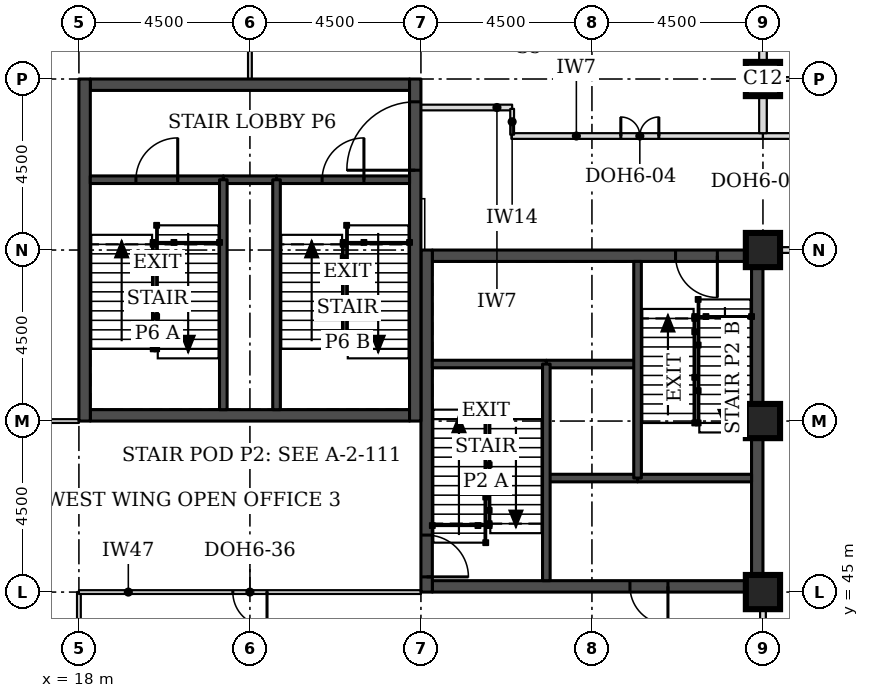
"""IFC4 building model, lengths in metres.
Left out: names, types, materials, properties, quantities, classifications, styles, units other than length and angle.
Written with IfcOpenShell. Run it as: python <this file> out.ifc"""

import sys

from ifc_helpers import new_model, si_unit, direction, frame, frame_2d, origin, origin_2d, place, context, subcontext, project, spatial, rectangle, extrude, element, fill, save


model = new_model("IFC4")
c1 = context("Model", 3, precision=1e-05, world=origin(), true_north=direction((0.0, 1.0)))
c2 = subcontext(c1, "Body", "Model", "MODEL_VIEW")
j1 = project(units=[si_unit("LENGTHUNIT", "METRE"), si_unit("PLANEANGLEUNIT", "RADIAN")], contexts=[c1])
p1 = place(None, origin())
s1 = spatial("IfcSite", under=j1, at=p1, CompositionType="ELEMENT")
p2 = place(p1, origin())
s2 = spatial("IfcBuilding", under=s1, at=p2, CompositionType="ELEMENT")
p3 = place(p2, frame((0.0, 0.0, 184.7)))
s3 = spatial("IfcBuildingStorey", under=s2, at=p3, CompositionType="ELEMENT", Elevation=184.7)
for number, where, z_axis, x_axis in (
    (1, (36.0, 45.0, 0.0), (0.0, 0.0, 1.0), (1.0, 0.0, 0.0)),
    (2, (36.0, 49.5, 0.0), (0.0, 0.0, 1.0), (1.0, 0.0, 0.0)),
    (3, (36.0, 54.0, 0.0), (0.0, 0.0, 1.0), (1.0, 0.0, 0.0)),
    (4, (36.0, 58.5, 0.0), (0.0, 0.0, 1.0), (1.0, 0.0, 0.0)),
):
    element("IfcColumn", number, at=place(p3, frame(where, z_axis=z_axis, x_axis=x_axis)), inside=s3, PredefinedType="COLUMN", context=c2, shape_type="SweptSolid", body=[
        extrude(rectangle(XDim=0.9, YDim=0.9, at=origin_2d()), origin(), (0.0, 0.0, 1.0), 3.7),
    ])
p4 = place(p3, frame((27.3, 45.15, 0.0), z_axis=(0.0, 0.0, 1.0), x_axis=(1.0, 0.0, 0.0)))
e5 = element("IfcWall", 5, at=p4, inside=s3, PredefinedType="SHEAR", context=c2, shape_type="SweptSolid", body=[
    extrude(rectangle(XDim=8.4, YDim=0.3, at=frame_2d((4.2, 0.0))), origin(), (0.0, 0.0, 1.0), 3.7),
])
p5 = place(p4, frame((5.2, 0.0, 0.0)))
e6 = element("IfcOpeningElement", 6, at=p5, cuts=e5, PredefinedType="OPENING", context=c2, shape_type="SweptSolid", body=[
    extrude(rectangle(XDim=1.0, YDim=2.1, at=frame_2d((0.5, 1.05))), frame((0.0, 0.16, 0.0), z_axis=(0.0, -1.0, 0.0), x_axis=(1.0, 0.0, 0.0)), (0.0, 0.0, 1.0), 0.32),
])
p6 = place(p3, frame((27.3, 53.85, 0.0), z_axis=(0.0, 0.0, 1.0), x_axis=(1.0, 0.0, 0.0)))
e7 = element("IfcWall", 7, at=p6, inside=s3, PredefinedType="SHEAR", context=c2, shape_type="SweptSolid", body=[
    extrude(rectangle(XDim=8.4, YDim=0.3, at=frame_2d((4.2, 0.0))), origin(), (0.0, 0.0, 1.0), 3.7),
])
p7 = place(p6, frame((6.4, 0.0, 0.0)))
e8 = element("IfcOpeningElement", 8, at=p7, cuts=e7, PredefinedType="OPENING", context=c2, shape_type="SweptSolid", body=[
    extrude(rectangle(XDim=1.1, YDim=2.1, at=frame_2d((0.55, 1.05))), frame((0.0, 0.16, 0.0), z_axis=(0.0, -1.0, 0.0), x_axis=(1.0, 0.0, 0.0)), (0.0, 0.0, 1.0), 0.32),
])
p8 = place(p3, frame((27.15, 45.0, 0.0), z_axis=(0.0, 0.0, 1.0), x_axis=(0.0, 1.0, 0.0)))
e9 = element("IfcWall", 9, at=p8, inside=s3, PredefinedType="SHEAR", context=c2, shape_type="SweptSolid", body=[
    extrude(rectangle(XDim=9.0, YDim=0.3, at=frame_2d((4.5, 0.0))), origin(), (0.0, 0.0, 1.0), 3.7),
])
p9 = place(p8, frame((0.4, 0.0, 0.0)))
e10 = element("IfcOpeningElement", 10, at=p9, cuts=e9, PredefinedType="OPENING", context=c2, shape_type="SweptSolid", body=[
    extrude(rectangle(XDim=1.1, YDim=2.1, at=frame_2d((0.55, 1.05))), frame((0.0, 0.16, 0.0), z_axis=(0.0, -1.0, 0.0), x_axis=(1.0, 0.0, 0.0)), (0.0, 0.0, 1.0), 0.32),
])
p10 = place(p3, frame((35.85, 45.0, 0.0), z_axis=(0.0, 0.0, 1.0), x_axis=(0.0, 1.0, 0.0)))
e11 = element("IfcWall", 11, at=p10, inside=s3, PredefinedType="SHEAR", context=c2, shape_type="SweptSolid", body=[
    extrude(rectangle(XDim=9.0, YDim=0.3, at=frame_2d((4.5, 0.0))), origin(), (0.0, 0.0, 1.0), 3.7),
])
for number, where, z_axis, x_axis in (
    (12, (18.3, 49.65, 0.0), (0.0, 0.0, 1.0), (1.0, 0.0, 0.0)),
    (13, (18.3, 58.35, 0.0), (0.0, 0.0, 1.0), (1.0, 0.0, 0.0)),
):
    element("IfcWall", number, at=place(p3, frame(where, z_axis=z_axis, x_axis=x_axis)), inside=s3, PredefinedType="SHEAR", context=c2, shape_type="SweptSolid", body=[
        extrude(rectangle(XDim=8.4, YDim=0.3, at=frame_2d((4.2, 0.0))), origin(), (0.0, 0.0, 1.0), 3.7),
    ])
p11 = place(p3, frame((18.15, 49.5, 0.0), z_axis=(0.0, 0.0, 1.0), x_axis=(0.0, 1.0, 0.0)))
e14 = element("IfcWall", 14, at=p11, inside=s3, PredefinedType="SHEAR", context=c2, shape_type="SweptSolid", body=[
    extrude(rectangle(XDim=9.0, YDim=0.3, at=frame_2d((4.5, 0.0))), origin(), (0.0, 0.0, 1.0), 3.7),
])
p12 = place(p3, frame((26.85, 49.5, 0.0), z_axis=(0.0, 0.0, 1.0), x_axis=(0.0, 1.0, 0.0)))
e15 = element("IfcWall", 15, at=p12, inside=s3, PredefinedType="SHEAR", context=c2, shape_type="SweptSolid", body=[
    extrude(rectangle(XDim=9.0, YDim=0.3, at=frame_2d((4.5, 0.0))), origin(), (0.0, 0.0, 1.0), 3.7),
])
p13 = place(p12, frame((6.6, 0.0, 0.0)))
e16 = element("IfcOpeningElement", 16, at=p13, cuts=e15, PredefinedType="OPENING", context=c2, shape_type="SweptSolid", body=[
    extrude(rectangle(XDim=1.8, YDim=2.1, at=frame_2d((0.9, 1.05))), frame((0.0, 0.16, 0.0), z_axis=(0.0, -1.0, 0.0), x_axis=(1.0, 0.0, 0.0)), (0.0, 0.0, 1.0), 0.32),
])
p14 = place(p3, frame((17.792, 63.676, 0.0), z_axis=(0.0, 0.0, 1.0), x_axis=(-0.707106781187, -0.707106781187, 0.0)))
e17 = element("IfcWall", 17, at=p14, inside=s3, PredefinedType="STANDARD", context=c2, shape_type="SweptSolid", body=[
    extrude(rectangle(XDim=7.027, YDim=0.35, at=frame_2d((3.513, 0.0))), origin(), (0.0, 0.0, 1.0), 3.525),
])
p15 = place(p14, frame((1.863, 0.0, 0.9)))
e18 = element("IfcOpeningElement", 18, at=p15, cuts=e17, PredefinedType="OPENING", context=c2, shape_type="SweptSolid", body=[
    extrude(rectangle(XDim=3.3, YDim=1.9, at=frame_2d((1.65, 0.95))), frame((0.0, 0.185, 0.0), z_axis=(0.0, -1.0, 0.0), x_axis=(1.0, 0.0, 0.0)), (0.0, 0.0, 1.0), 0.37),
])
p16 = place(p3, frame((12.824, 44.792, 0.0), z_axis=(0.0, 0.0, 1.0), x_axis=(0.707106781187, -0.707106781187, 0.0)))
e19 = element("IfcWall", 19, at=p16, inside=s3, PredefinedType="STANDARD", context=c2, shape_type="SweptSolid", body=[
    extrude(rectangle(XDim=7.027, YDim=0.35, at=frame_2d((3.513, 0.0))), origin(), (0.0, 0.0, 1.0), 3.525),
])
p17 = place(p16, frame((1.863, 0.0, 0.9)))
e20 = element("IfcOpeningElement", 20, at=p17, cuts=e19, PredefinedType="OPENING", context=c2, shape_type="SweptSolid", body=[
    extrude(rectangle(XDim=3.3, YDim=1.9, at=frame_2d((1.65, 0.95))), frame((0.0, 0.185, 0.0), z_axis=(0.0, -1.0, 0.0), x_axis=(1.0, 0.0, 0.0)), (0.0, 0.0, 1.0), 0.37),
])
p18 = place(p3, frame((36.45, 54.0, 0.0), z_axis=(0.0, 0.0, 1.0), x_axis=(1.0, 0.0, 0.0)))
e21 = element("IfcWall", 21, at=p18, inside=s3, PredefinedType="PARTITIONING", context=c2, shape_type="SweptSolid", body=[
    extrude(rectangle(XDim=5.625, YDim=0.15, at=frame_2d((2.812, 0.0))), origin(), (0.0, 0.0, 1.0), 3.55),
])
p19 = place(p3, frame((29.38, 57.0, 0.0), z_axis=(0.0, 0.0, 1.0), x_axis=(1.0, 0.0, 0.0)))
e22 = element("IfcWall", 22, at=p19, inside=s3, PredefinedType="PARTITIONING", context=c2, shape_type="SweptSolid", body=[
    extrude(rectangle(XDim=6.62, YDim=0.15, at=frame_2d((3.31, 0.0))), origin(), (0.0, 0.0, 1.0), 3.55),
])
p20 = place(p19, frame((2.88, 0.0, 0.0)))
e23 = element("IfcOpeningElement", 23, at=p20, cuts=e22, PredefinedType="OPENING", context=c2, shape_type="SweptSolid", body=[
    extrude(rectangle(XDim=1.0, YDim=2.1, at=frame_2d((0.5, 1.05))), frame((0.0, 0.085, 0.0), z_axis=(0.0, -1.0, 0.0), x_axis=(1.0, 0.0, 0.0)), (0.0, 0.0, 1.0), 0.17),
])
p21 = place(p3, frame((36.0, 57.0, 0.0), z_axis=(0.0, 0.0, 1.0), x_axis=(1.0, 0.0, 0.0)))
e24 = element("IfcWall", 24, at=p21, inside=s3, PredefinedType="PARTITIONING", context=c2, shape_type="SweptSolid", body=[
    extrude(rectangle(XDim=6.075, YDim=0.15, at=frame_2d((3.038, 0.0))), origin(), (0.0, 0.0, 1.0), 3.55),
])
p22 = place(p21, frame((2.55, 0.0, 0.0)))
e25 = element("IfcOpeningElement", 25, at=p22, cuts=e24, PredefinedType="OPENING", context=c2, shape_type="SweptSolid", body=[
    extrude(rectangle(XDim=1.0, YDim=2.1, at=frame_2d((0.5, 1.05))), frame((0.0, 0.085, 0.0), z_axis=(0.0, -1.0, 0.0), x_axis=(1.0, 0.0, 0.0)), (0.0, 0.0, 1.0), 0.17),
])
p23 = place(p3, frame((36.45, 58.5, 0.0), z_axis=(0.0, 0.0, 1.0), x_axis=(1.0, 0.0, 0.0)))
e26 = element("IfcWall", 26, at=p23, inside=s3, PredefinedType="PARTITIONING", context=c2, shape_type="SweptSolid", body=[
    extrude(rectangle(XDim=2.6, YDim=0.1, at=frame_2d((1.3, 0.0))), origin(), (0.0, 0.0, 1.0), 3.55),
])
p24 = place(p23, frame((0.85, 0.0, 0.0)))
e27 = element("IfcOpeningElement", 27, at=p24, cuts=e26, PredefinedType="OPENING", context=c2, shape_type="SweptSolid", body=[
    extrude(rectangle(XDim=0.9, YDim=2.1, at=frame_2d((0.45, 1.05))), frame((0.0, 0.06, 0.0), z_axis=(0.0, -1.0, 0.0), x_axis=(1.0, 0.0, 0.0)), (0.0, 0.0, 1.0), 0.12),
])
p25 = place(p3, frame((36.0, 40.95, 0.0), z_axis=(0.0, 0.0, 1.0), x_axis=(0.0, 1.0, 0.0)))
e28 = element("IfcWall", 28, at=p25, inside=s3, PredefinedType="PARTITIONING", context=c2, shape_type="SweptSolid", body=[
    extrude(rectangle(XDim=3.63, YDim=0.15, at=frame_2d((1.815, 0.0))), origin(), (0.0, 0.0, 1.0), 2.8),
])
p26 = place(p25, frame((1.4, 0.0, 0.0)))
e29 = element("IfcOpeningElement", 29, at=p26, cuts=e28, PredefinedType="OPENING", context=c2, shape_type="SweptSolid", body=[
    extrude(rectangle(XDim=0.9, YDim=2.1, at=frame_2d((0.45, 1.05))), frame((0.0, 0.085, 0.0), z_axis=(0.0, -1.0, 0.0), x_axis=(1.0, 0.0, 0.0)), (0.0, 0.0, 1.0), 0.17),
])
p27 = place(p3, frame((36.0, 57.075, 0.0), z_axis=(0.0, 0.0, 1.0), x_axis=(0.0, 1.0, 0.0)))
e30 = element("IfcWall", 30, at=p27, inside=s3, PredefinedType="PARTITIONING", context=c2, shape_type="SweptSolid", body=[
    extrude(rectangle(XDim=0.975, YDim=0.2, at=frame_2d((0.488, 0.0))), origin(), (0.0, 0.0, 1.0), 2.8),
])
p28 = place(p3, frame((36.0, 58.92, 0.0), z_axis=(0.0, 0.0, 1.0), x_axis=(0.0, 1.0, 0.0)))
e31 = element("IfcWall", 31, at=p28, inside=s3, PredefinedType="PARTITIONING", context=c2, shape_type="SweptSolid", body=[
    extrude(rectangle(XDim=1.08, YDim=0.2, at=frame_2d((0.54, 0.0))), origin(), (0.0, 0.0, 1.0), 2.8),
])
p29 = place(p3, frame((22.5, 63.0, 0.0), z_axis=(0.0, 0.0, 1.0), x_axis=(0.0, -1.0, 0.0)))
e32 = element("IfcWall", 32, at=p29, inside=s3, PredefinedType="PARTITIONING", context=c2, shape_type="SweptSolid", body=[
    extrude(rectangle(XDim=4.5, YDim=0.1, at=frame_2d((2.25, 0.0))), origin(), (0.0, 0.0, 1.0), 3.55),
])
p30 = place(p29, frame((1.8, 0.0, 0.0)))
e33 = element("IfcOpeningElement", 33, at=p30, cuts=e32, PredefinedType="OPENING", context=c2, shape_type="SweptSolid", body=[
    extrude(rectangle(XDim=0.9, YDim=2.1, at=frame_2d((0.45, 1.05))), frame((0.0, 0.06, 0.0), z_axis=(0.0, -1.0, 0.0), x_axis=(1.0, 0.0, 0.0)), (0.0, 0.0, 1.0), 0.12),
])
p31 = place(p3, frame((13.5, 49.5, 0.0), z_axis=(0.0, 0.0, 1.0), x_axis=(1.0, 0.0, 0.0)))
e34 = element("IfcWall", 34, at=p31, inside=s3, PredefinedType="PARTITIONING", context=c2, shape_type="SweptSolid", body=[
    extrude(rectangle(XDim=4.5, YDim=0.1, at=frame_2d((2.25, 0.0))), origin(), (0.0, 0.0, 1.0), 3.55),
])
p32 = place(p31, frame((1.8, 0.0, 0.0)))
e35 = element("IfcOpeningElement", 35, at=p32, cuts=e34, PredefinedType="OPENING", context=c2, shape_type="SweptSolid", body=[
    extrude(rectangle(XDim=0.9, YDim=2.1, at=frame_2d((0.45, 1.05))), frame((0.0, 0.06, 0.0), z_axis=(0.0, -1.0, 0.0), x_axis=(1.0, 0.0, 0.0)), (0.0, 0.0, 1.0), 0.12),
])
p33 = place(p3, frame((18.0, 40.5, 0.0), z_axis=(0.0, 0.0, 1.0), x_axis=(0.0, 1.0, 0.0)))
e36 = element("IfcWall", 36, at=p33, inside=s3, PredefinedType="PARTITIONING", context=c2, shape_type="SweptSolid", body=[
    extrude(rectangle(XDim=4.5, YDim=0.1, at=frame_2d((2.25, 0.0))), origin(), (0.0, 0.0, 1.0), 3.55),
])
p34 = place(p3, frame((18.0, 45.0, 0.0), z_axis=(0.0, 0.0, 1.0), x_axis=(1.0, 0.0, 0.0)))
e37 = element("IfcWall", 37, at=p34, inside=s3, PredefinedType="PARTITIONING", context=c2, shape_type="SweptSolid", body=[
    extrude(rectangle(XDim=9.0, YDim=0.1, at=frame_2d((4.5, 0.0))), origin(), (0.0, 0.0, 1.0), 2.55),
])
p35 = place(p34, frame((4.05, 0.0, 0.0)))
e38 = element("IfcOpeningElement", 38, at=p35, cuts=e37, PredefinedType="OPENING", context=c2, shape_type="SweptSolid", body=[
    extrude(rectangle(XDim=0.9, YDim=2.1, at=frame_2d((0.45, 1.05))), frame((0.0, 0.06, 0.0), z_axis=(0.0, -1.0, 0.0), x_axis=(1.0, 0.0, 0.0)), (0.0, 0.0, 1.0), 0.12),
])
p36 = place(p3, frame((27.0, 57.75, 0.0), z_axis=(0.0, 0.0, 1.0), x_axis=(1.0, 0.0, 0.0)))
e39 = element("IfcWall", 39, at=p36, inside=s3, PredefinedType="PARTITIONING", context=c2, shape_type="SweptSolid", body=[
    extrude(rectangle(XDim=2.4, YDim=0.15, at=frame_2d((1.2, 0.0))), origin(), (0.0, 0.0, 1.0), 3.55),
])
p37 = place(p3, frame((29.4, 57.715, 0.0), z_axis=(0.0, 0.0, 1.0), x_axis=(0.0, -1.0, 0.0)))
e40 = element("IfcWall", 40, at=p37, inside=s3, PredefinedType="PARTITIONING", context=c2, shape_type="SweptSolid", body=[
    extrude(rectangle(XDim=0.68, YDim=0.1, at=frame_2d((0.34, 0.0))), origin(), (0.0, 0.0, 1.0), 3.55),
])
p38 = place(p3, frame((30.3, 48.0, 0.0), z_axis=(0.0, 0.0, 1.0), x_axis=(1.0, 0.0, 0.0)))
e41 = element("IfcWall", 41, at=p38, inside=s3, PredefinedType="SOLIDWALL", context=c2, shape_type="SweptSolid", body=[
    extrude(rectangle(XDim=2.4, YDim=0.2, at=frame_2d((1.2, 0.0))), origin(), (0.0, 0.0, 1.0), 3.55),
])
p39 = place(p3, frame((32.7, 48.0, 0.0), z_axis=(0.0, 0.0, 1.0), x_axis=(1.0, 0.0, 0.0)))
e42 = element("IfcWall", 42, at=p39, inside=s3, PredefinedType="SOLIDWALL", context=c2, shape_type="SweptSolid", body=[
    extrude(rectangle(XDim=3.0, YDim=0.2, at=frame_2d((1.5, 0.0))), origin(), (0.0, 0.0, 1.0), 3.55),
])
p40 = place(p3, frame((30.3, 51.0, 0.0), z_axis=(0.0, 0.0, 1.0), x_axis=(1.0, 0.0, 0.0)))
e43 = element("IfcWall", 43, at=p40, inside=s3, PredefinedType="SOLIDWALL", context=c2, shape_type="SweptSolid", body=[
    extrude(rectangle(XDim=2.4, YDim=0.2, at=frame_2d((1.2, 0.0))), origin(), (0.0, 0.0, 1.0), 3.7),
])
p41 = place(p3, frame((27.3, 51.0, 0.0), z_axis=(0.0, 0.0, 1.0), x_axis=(1.0, 0.0, 0.0)))
e44 = element("IfcWall", 44, at=p41, inside=s3, PredefinedType="SOLIDWALL", context=c2, shape_type="SweptSolid", body=[
    extrude(rectangle(XDim=3.0, YDim=0.2, at=frame_2d((1.5, 0.0))), origin(), (0.0, 0.0, 1.0), 3.55),
])
for number, where, z_axis, x_axis in (
    (45, (30.3, 45.3, 0.0), (0.0, 0.0, 1.0), (0.0, 1.0, 0.0)),
    (46, (32.7, 48.0, 0.0), (0.0, 0.0, 1.0), (0.0, 1.0, 0.0)),
):
    element("IfcWall", number, at=place(p3, frame(where, z_axis=z_axis, x_axis=x_axis)), inside=s3, PredefinedType="SOLIDWALL", context=c2, shape_type="SweptSolid", body=[
        extrude(rectangle(XDim=5.7, YDim=0.2, at=frame_2d((2.85, 0.0))), origin(), (0.0, 0.0, 1.0), 3.55),
    ])
p42 = place(p3, frame((21.8, 55.85, 0.0), z_axis=(0.0, 0.0, 1.0), x_axis=(1.0, 0.0, 0.0)))
e47 = element("IfcWall", 47, at=p42, inside=s3, PredefinedType="SOLIDWALL", context=c2, shape_type="SweptSolid", body=[
    extrude(rectangle(XDim=1.4, YDim=0.2, at=frame_2d((0.7, 0.0))), origin(), (0.0, 0.0, 1.0), 3.55),
])
p43 = place(p3, frame((18.3, 55.85, 0.0), z_axis=(0.0, 0.0, 1.0), x_axis=(1.0, 0.0, 0.0)))
e48 = element("IfcWall", 48, at=p43, inside=s3, PredefinedType="SOLIDWALL", context=c2, shape_type="SweptSolid", body=[
    extrude(rectangle(XDim=3.5, YDim=0.2, at=frame_2d((1.75, 0.0))), origin(), (0.0, 0.0, 1.0), 3.55),
])
p44 = place(p43, frame((1.2, 0.0, 0.0)))
e49 = element("IfcOpeningElement", 49, at=p44, cuts=e48, PredefinedType="OPENING", context=c2, shape_type="SweptSolid", body=[
    extrude(rectangle(XDim=1.1, YDim=2.1, at=frame_2d((0.55, 1.05))), frame((0.0, 0.11, 0.0), z_axis=(0.0, -1.0, 0.0), x_axis=(1.0, 0.0, 0.0)), (0.0, 0.0, 1.0), 0.22),
])
p45 = place(p3, frame((23.2, 55.85, 0.0), z_axis=(0.0, 0.0, 1.0), x_axis=(1.0, 0.0, 0.0)))
e50 = element("IfcWall", 50, at=p45, inside=s3, PredefinedType="SOLIDWALL", context=c2, shape_type="SweptSolid", body=[
    extrude(rectangle(XDim=3.5, YDim=0.2, at=frame_2d((1.75, 0.0))), origin(), (0.0, 0.0, 1.0), 3.55),
])
p46 = place(p45, frame((1.2, 0.0, 0.0)))
e51 = element("IfcOpeningElement", 51, at=p46, cuts=e50, PredefinedType="OPENING", context=c2, shape_type="SweptSolid", body=[
    extrude(rectangle(XDim=1.1, YDim=2.1, at=frame_2d((0.55, 1.05))), frame((0.0, 0.11, 0.0), z_axis=(0.0, -1.0, 0.0), x_axis=(1.0, 0.0, 0.0)), (0.0, 0.0, 1.0), 0.22),
])
for number, where, z_axis, x_axis in (
    (52, (21.8, 49.8, 0.0), (0.0, 0.0, 1.0), (0.0, 1.0, 0.0)),
    (53, (23.2, 49.8, 0.0), (0.0, 0.0, 1.0), (0.0, 1.0, 0.0)),
):
    element("IfcWall", number, at=place(p3, frame(where, z_axis=z_axis, x_axis=x_axis)), inside=s3, PredefinedType="SOLIDWALL", context=c2, shape_type="SweptSolid", body=[
        extrude(rectangle(XDim=6.05, YDim=0.2, at=frame_2d((3.025, 0.0))), origin(), (0.0, 0.0, 1.0), 3.55),
    ])
p47 = place(p20, origin())
e54 = element("IfcDoor", 54, at=p47, inside=s3, OperationType="DOUBLE_DOOR_SINGLE_SWING", PredefinedType="DOOR", context=c2, shape_type="SweptSolid", body=[
    extrude(rectangle(XDim=1.0, YDim=2.1, at=frame_2d((0.5, 1.05))), frame((0.0, 0.025, 0.0), z_axis=(0.0, -1.0, 0.0), x_axis=(1.0, 0.0, 0.0)), (0.0, 0.0, 1.0), 0.05),
])
fill(e23, e54)
p48 = place(p35, frame((0.9, 0.0, 0.0), z_axis=(0.0, 0.0, 1.0), x_axis=(-1.0, 0.0, 0.0)))
e55 = element("IfcDoor", 55, at=p48, inside=s3, OperationType="SINGLE_SWING_LEFT", PredefinedType="DOOR", context=c2, shape_type="SweptSolid", body=[
    extrude(rectangle(XDim=0.9, YDim=2.1, at=frame_2d((0.45, 1.05))), frame((0.0, 0.025, 0.0), z_axis=(0.0, -1.0, 0.0), x_axis=(1.0, 0.0, 0.0)), (0.0, 0.0, 1.0), 0.05),
])
fill(e38, e55)
p49 = place(p9, frame((1.1, 0.0, 0.0), z_axis=(0.0, 0.0, 1.0), x_axis=(-1.0, 0.0, 0.0)))
e56 = element("IfcDoor", 56, at=p49, inside=s3, OperationType="SINGLE_SWING_RIGHT", PredefinedType="DOOR", context=c2, shape_type="SweptSolid", body=[
    extrude(rectangle(XDim=1.1, YDim=2.1, at=frame_2d((0.55, 1.05))), frame((0.0, 0.025, 0.0), z_axis=(0.0, -1.0, 0.0), x_axis=(1.0, 0.0, 0.0)), (0.0, 0.0, 1.0), 0.05),
])
fill(e10, e56)
p50 = place(p7, frame((1.1, 0.0, 0.0), z_axis=(0.0, 0.0, 1.0), x_axis=(-1.0, 0.0, 0.0)))
e57 = element("IfcDoor", 57, at=p50, inside=s3, OperationType="SINGLE_SWING_LEFT", PredefinedType="DOOR", context=c2, shape_type="SweptSolid", body=[
    extrude(rectangle(XDim=1.1, YDim=2.1, at=frame_2d((0.55, 1.05))), frame((0.0, 0.025, 0.0), z_axis=(0.0, -1.0, 0.0), x_axis=(1.0, 0.0, 0.0)), (0.0, 0.0, 1.0), 0.05),
])
fill(e8, e57)
p51 = place(p5, frame((1.0, 0.0, 0.0), z_axis=(0.0, 0.0, 1.0), x_axis=(-1.0, 0.0, 0.0)))
e58 = element("IfcDoor", 58, at=p51, inside=s3, OperationType="SINGLE_SWING_LEFT", PredefinedType="DOOR", context=c2, shape_type="SweptSolid", body=[
    extrude(rectangle(XDim=1.0, YDim=2.1, at=frame_2d((0.5, 1.05))), frame((0.0, 0.025, 0.0), z_axis=(0.0, -1.0, 0.0), x_axis=(1.0, 0.0, 0.0)), (0.0, 0.0, 1.0), 0.05),
])
fill(e6, e58)
p52 = place(p44, origin())
e59 = element("IfcDoor", 59, at=p52, inside=s3, OperationType="SINGLE_SWING_RIGHT", PredefinedType="DOOR", context=c2, shape_type="SweptSolid", body=[
    extrude(rectangle(XDim=1.1, YDim=2.1, at=frame_2d((0.55, 1.05))), frame((0.0, 0.025, 0.0), z_axis=(0.0, -1.0, 0.0), x_axis=(1.0, 0.0, 0.0)), (0.0, 0.0, 1.0), 0.05),
])
fill(e49, e59)
p53 = place(p46, origin())
e60 = element("IfcDoor", 60, at=p53, inside=s3, OperationType="SINGLE_SWING_RIGHT", PredefinedType="DOOR", context=c2, shape_type="SweptSolid", body=[
    extrude(rectangle(XDim=1.1, YDim=2.1, at=frame_2d((0.55, 1.05))), frame((0.0, 0.025, 0.0), z_axis=(0.0, -1.0, 0.0), x_axis=(1.0, 0.0, 0.0)), (0.0, 0.0, 1.0), 0.05),
])
fill(e51, e60)
p54 = place(p13, origin())
e61 = element("IfcDoor", 61, at=p54, inside=s3, OperationType="SINGLE_SWING_LEFT", PredefinedType="DOOR", context=c2, shape_type="SweptSolid", body=[
    extrude(rectangle(XDim=1.8, YDim=2.1, at=frame_2d((0.9, 1.05))), frame((0.0, 0.025, 0.0), z_axis=(0.0, -1.0, 0.0), x_axis=(1.0, 0.0, 0.0)), (0.0, 0.0, 1.0), 0.05),
])
fill(e16, e61)
save(model, sys.argv[1])
